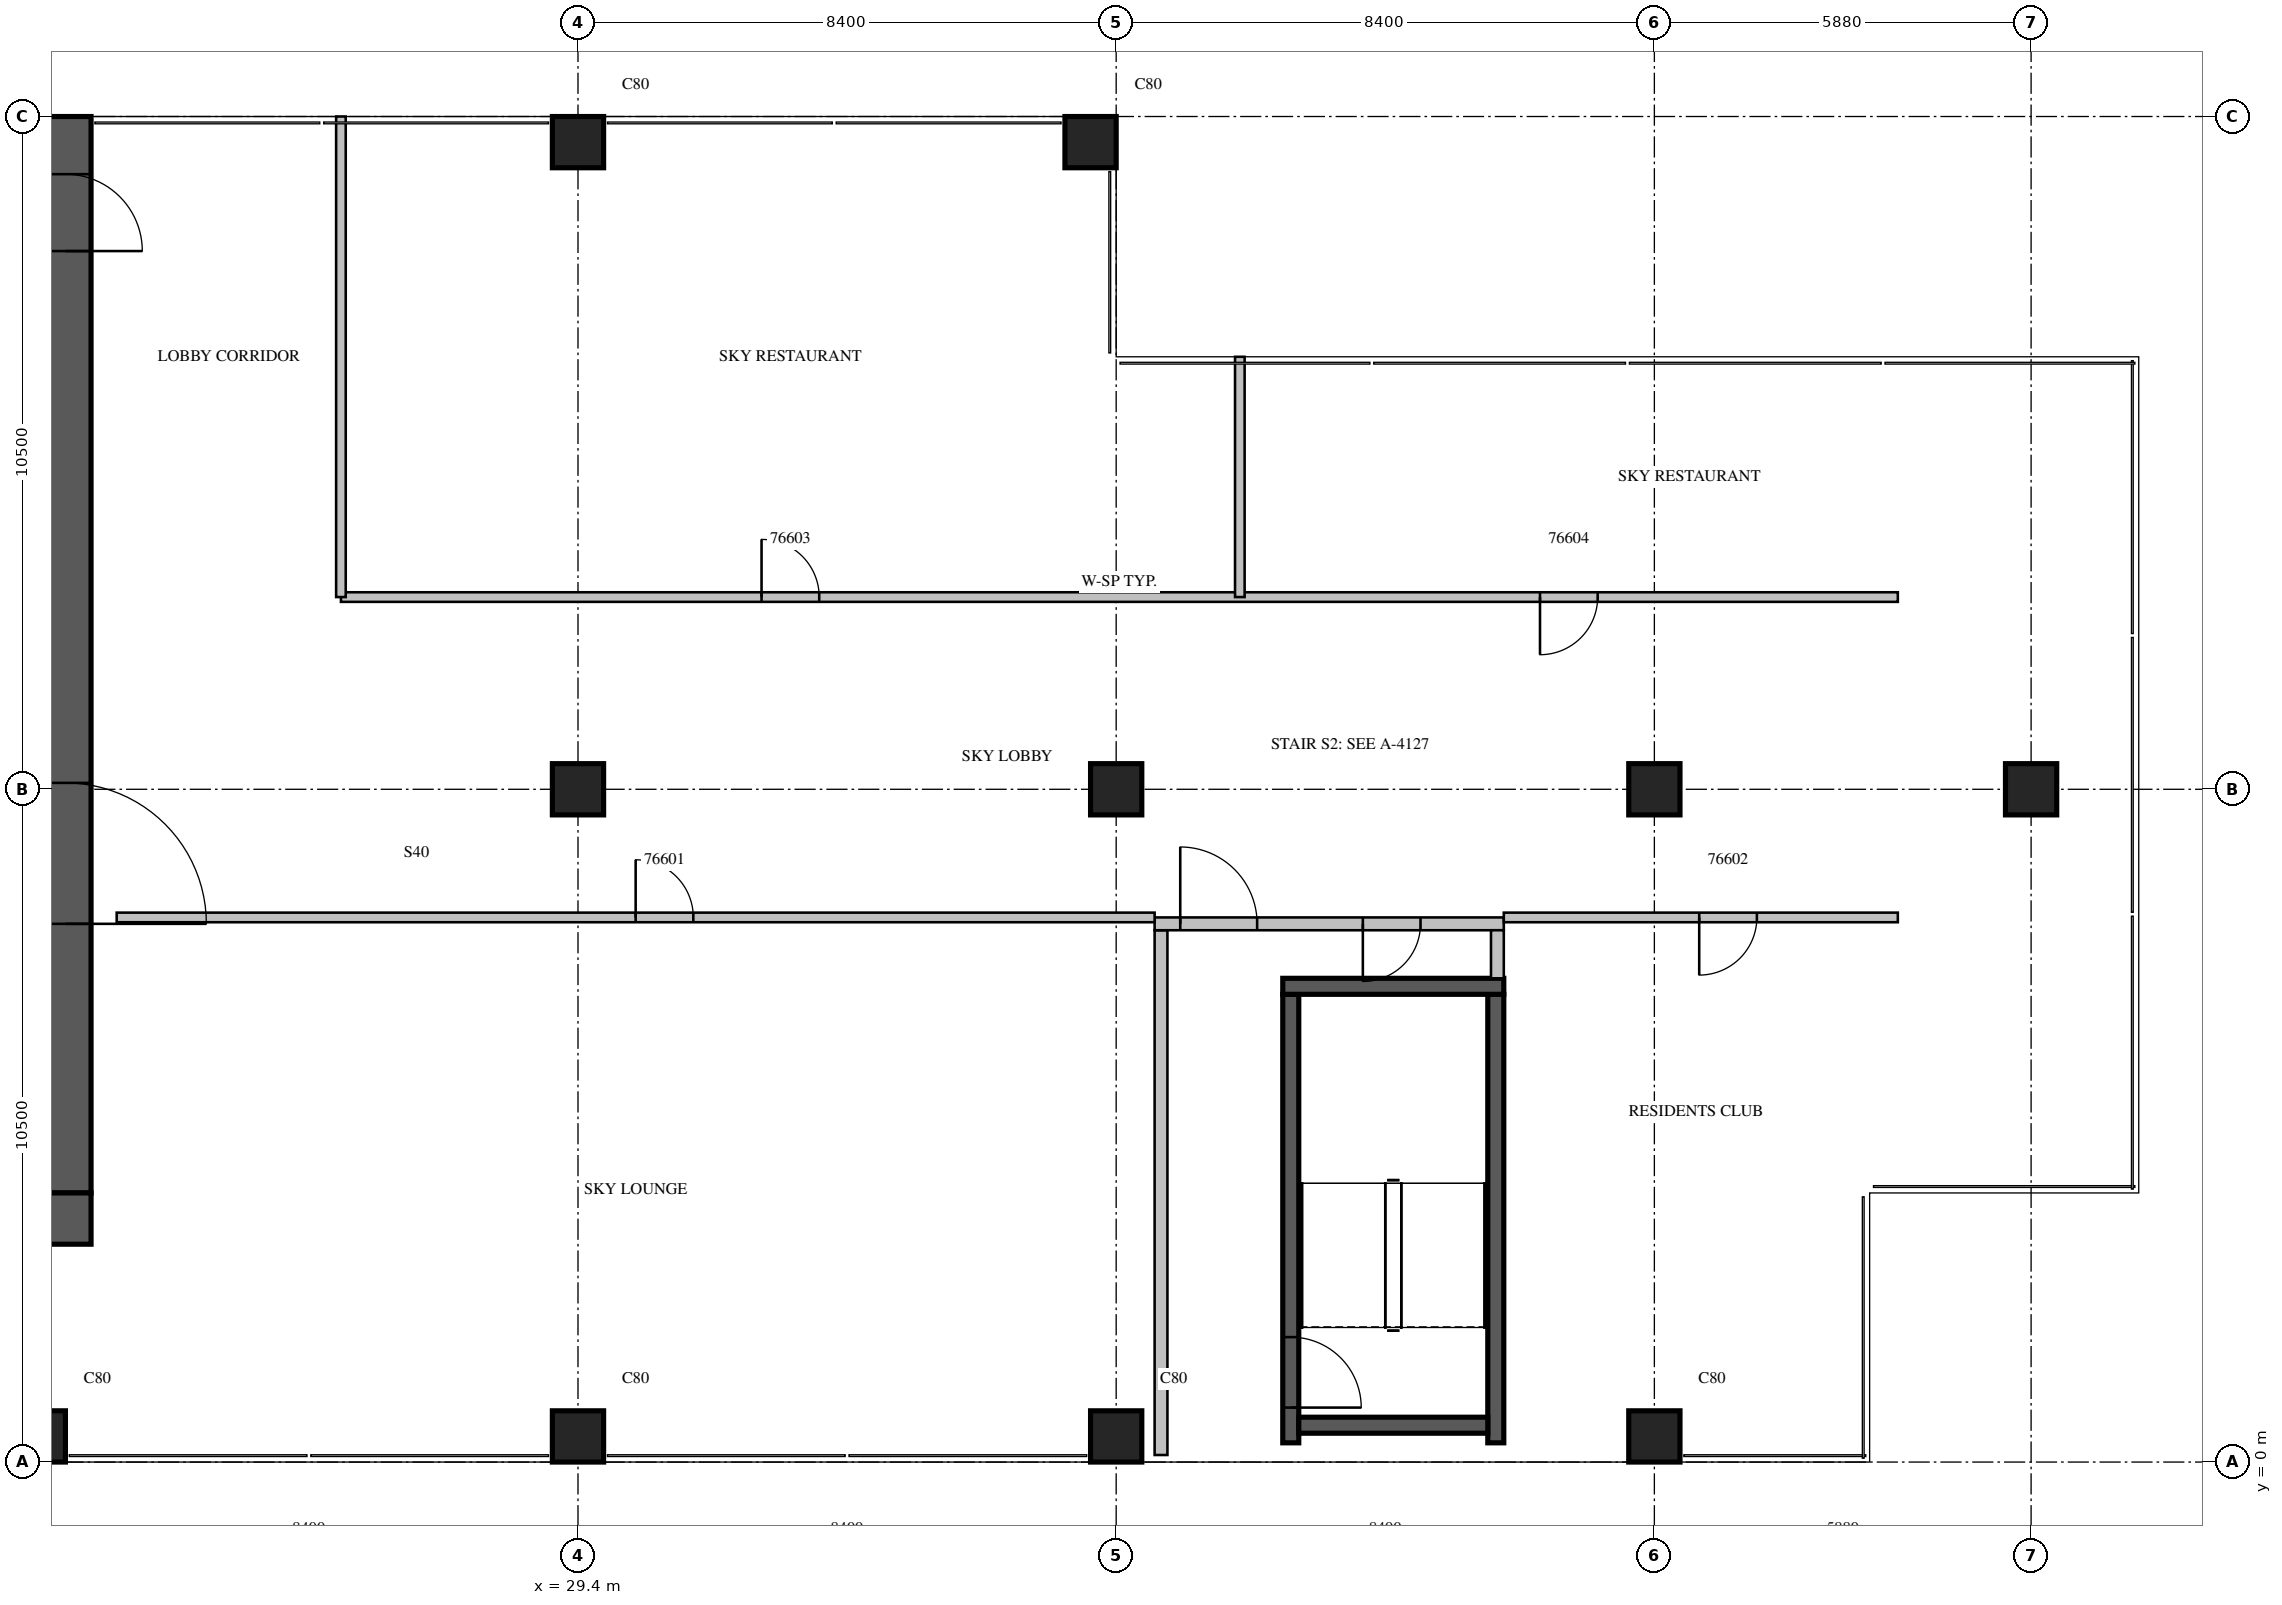
"""IFC4 building model, lengths in metres.
Left out: names, types, materials, properties, quantities, classifications, styles, units other than length and angle.
Written with IfcOpenShell. Run it as: python <this file> out.ifc"""

import sys

from ifc_helpers import new_model, si_unit, direction, frame, frame_2d, origin, origin_2d, place, context, subcontext, project, spatial, rectangle, extrude, source, transform, mapped, element, fill, save


model = new_model("IFC4")
c1 = context("Model", 3, precision=1e-05, world=origin(), true_north=direction((0.0, 1.0)))
c2 = subcontext(c1, "Body", "Model", "MODEL_VIEW")
j1 = project(units=[si_unit("LENGTHUNIT", "METRE"), si_unit("PLANEANGLEUNIT", "RADIAN")], contexts=[c1])
p1 = place(None, origin())
s1 = spatial("IfcSite", under=j1, at=p1, CompositionType="ELEMENT")
p2 = place(p1, origin())
s2 = spatial("IfcBuilding", under=s1, at=p2, CompositionType="ELEMENT")
p3 = place(p2, frame((0.0, 0.0, 277.0)))
s3 = spatial("IfcBuildingStorey", under=s2, at=p3, CompositionType="ELEMENT", Elevation=277.0)
m1 = source(origin(), c2, "Body", "SweptSolid", [
    extrude(rectangle(XDim=0.8, YDim=0.8, at=origin_2d()), origin(), (0.0, 0.0, 1.0), 7.5),
])
for number, where, z_axis, x_axis in (
    (1, (21.0, 0.4, 0.0), (0.0, 0.0, 1.0), (1.0, 0.0, 0.0)),
    (2, (29.4, 0.4, 0.0), (0.0, 0.0, 1.0), (1.0, 0.0, 0.0)),
    (3, (37.8, 0.4, 0.0), (0.0, 0.0, 1.0), (1.0, 0.0, 0.0)),
    (4, (46.2, 0.4, 0.0), (0.0, 0.0, 1.0), (1.0, 0.0, 0.0)),
    (5, (29.4, 10.5, 0.0), (0.0, 0.0, 1.0), (1.0, 0.0, 0.0)),
    (6, (37.8, 10.5, 0.0), (0.0, 0.0, 1.0), (1.0, 0.0, 0.0)),
    (7, (46.2, 10.5, 0.0), (0.0, 0.0, 1.0), (1.0, 0.0, 0.0)),
    (8, (52.08, 10.5, 0.0), (0.0, 0.0, 1.0), (1.0, 0.0, 0.0)),
    (9, (29.4, 20.6, 0.0), (0.0, 0.0, 1.0), (1.0, 0.0, 0.0)),
    (10, (37.4, 20.6, 0.0), (0.0, 0.0, 1.0), (1.0, 0.0, 0.0)),
):
    element("IfcColumn", number, at=place(p3, frame(where, z_axis=z_axis, x_axis=x_axis)), inside=s3, PredefinedType="COLUMN", context=c2, shape_type="MappedRepresentation", body=[
        mapped(m1, transform((0.0, 0.0, 0.0), scale=1.0)),
    ])
p4 = place(p3, frame((21.4, 4.2, 0.0), z_axis=(0.0, 0.0, 1.0), x_axis=(0.0, 1.0, 0.0)))
e11 = element("IfcWall", 11, at=p4, inside=s3, PredefinedType="SHEAR", context=c2, shape_type="SweptSolid", body=[
    extrude(rectangle(XDim=16.8, YDim=0.8, at=frame_2d((8.4, 0.0))), origin(), (0.0, 0.0, 1.0), 7.5),
])
m2 = source(origin(), c2, "Body", "SweptSolid", [
    extrude(rectangle(XDim=2.2, YDim=2.1, at=frame_2d((1.1, 1.05))), frame((0.0, 0.41, 0.0), z_axis=(0.0, -1.0, 0.0), x_axis=(1.0, 0.0, 0.0)), (0.0, 0.0, 1.0), 0.82),
])
p5 = place(p4, frame((4.2, 0.0, 0.0)))
e12 = element("IfcOpeningElement", 12, at=p5, cuts=e11, PredefinedType="OPENING", context=c2, shape_type="MappedRepresentation", body=[
    mapped(m2, transform((0.0, 0.0, 0.0), scale=1.0)),
])
m3 = source(origin(), c2, "Body", "SweptSolid", [
    extrude(rectangle(XDim=1.2, YDim=2.1, at=frame_2d((0.6, 1.05))), frame((0.0, 0.41, 0.0), z_axis=(0.0, -1.0, 0.0), x_axis=(1.0, 0.0, 0.0)), (0.0, 0.0, 1.0), 0.82),
])
p6 = place(p4, frame((14.7, 0.0, 0.0)))
e13 = element("IfcOpeningElement", 13, at=p6, cuts=e11, PredefinedType="OPENING", context=c2, shape_type="MappedRepresentation", body=[
    mapped(m3, transform((0.0, 0.0, 0.0), scale=1.0)),
])
m4 = source(origin(), c2, "Body", "SweptSolid", [
    extrude(rectangle(XDim=17.6, YDim=0.8, at=frame_2d((8.8, 0.0))), origin(), (0.0, 0.0, 1.0), 7.5),
])
p7 = place(p3, frame((4.2, 3.8, 0.0), z_axis=(0.0, 0.0, 1.0), x_axis=(1.0, 0.0, 0.0)))
e14 = element("IfcWall", 14, at=p7, inside=s3, PredefinedType="SHEAR", context=c2, shape_type="MappedRepresentation", body=[
    mapped(m4, transform((0.0, 0.0, 0.0), scale=1.0)),
])
m5 = source(origin(), c2, "Body", "SweptSolid", [
    extrude(rectangle(XDim=0.9, YDim=2.1, at=frame_2d((0.45, 1.05))), frame((0.0, 0.41, 0.0), z_axis=(0.0, -1.0, 0.0), x_axis=(1.0, 0.0, 0.0)), (0.0, 0.0, 1.0), 0.82),
])
p8 = place(p7, frame((11.55, 0.0, 0.0)))
e15 = element("IfcOpeningElement", 15, at=p8, cuts=e14, PredefinedType="OPENING", context=c2, shape_type="MappedRepresentation", body=[
    mapped(m5, transform((0.0, 0.0, 0.0), scale=1.0)),
])
m6 = source(origin(), c2, "Body", "SweptSolid", [
    extrude(rectangle(XDim=7.0, YDim=0.25, at=frame_2d((3.5, 0.0))), origin(), (0.0, 0.0, 1.0), 7.1),
])
p9 = place(p3, frame((40.525, 0.3, 0.0), z_axis=(0.0, 0.0, 1.0), x_axis=(0.0, 1.0, 0.0)))
e16 = element("IfcWall", 16, at=p9, inside=s3, PredefinedType="SOLIDWALL", context=c2, shape_type="MappedRepresentation", body=[
    mapped(m6, transform((0.0, 0.0, 0.0), scale=1.0)),
])
m7 = source(origin(), c2, "Body", "SweptSolid", [
    extrude(rectangle(XDim=1.1, YDim=2.1, at=frame_2d((0.55, 1.05))), frame((0.0, 0.135, 0.0), z_axis=(0.0, -1.0, 0.0), x_axis=(1.0, 0.0, 0.0)), (0.0, 0.0, 1.0), 0.27),
])
p10 = place(p9, frame((0.55, 0.0, 0.0)))
e17 = element("IfcOpeningElement", 17, at=p10, cuts=e16, PredefinedType="OPENING", context=c2, shape_type="MappedRepresentation", body=[
    mapped(m7, transform((0.0, 0.0, 0.0), scale=1.0)),
])
p11 = place(p3, frame((43.725, 0.3, 0.0), z_axis=(0.0, 0.0, 1.0), x_axis=(0.0, 1.0, 0.0)))
e18 = element("IfcWall", 18, at=p11, inside=s3, PredefinedType="SOLIDWALL", context=c2, shape_type="MappedRepresentation", body=[
    mapped(m6, transform((0.0, 0.0, 0.0), scale=1.0)),
])
m8 = source(origin(), c2, "Body", "SweptSolid", [
    extrude(rectangle(XDim=3.45, YDim=0.25, at=frame_2d((1.725, 0.0))), origin(), (0.0, 0.0, 1.0), 7.1),
])
p12 = place(p3, frame((40.4, 7.425, 0.0), z_axis=(0.0, 0.0, 1.0), x_axis=(1.0, 0.0, 0.0)))
e19 = element("IfcWall", 19, at=p12, inside=s3, PredefinedType="SOLIDWALL", context=c2, shape_type="MappedRepresentation", body=[
    mapped(m8, transform((0.0, 0.0, 0.0), scale=1.0)),
])
m9 = source(origin(), c2, "Body", "SweptSolid", [
    extrude(rectangle(XDim=2.95, YDim=0.25, at=frame_2d((1.475, 0.0))), origin(), (0.0, 0.0, 1.0), 7.1),
])
p13 = place(p3, frame((40.65, 0.575, 0.0), z_axis=(0.0, 0.0, 1.0), x_axis=(1.0, 0.0, 0.0)))
e20 = element("IfcWall", 20, at=p13, inside=s3, PredefinedType="SOLIDWALL", context=c2, shape_type="MappedRepresentation", body=[
    mapped(m9, transform((0.0, 0.0, 0.0), scale=1.0)),
])
p14 = place(p3, frame((38.5, 0.11, 0.0), z_axis=(0.0, 0.0, 1.0), x_axis=(0.0, 1.0, 0.0)))
e21 = element("IfcWall", 21, at=p14, inside=s3, PredefinedType="PARTITIONING", context=c2, shape_type="SweptSolid", body=[
    extrude(rectangle(XDim=8.19, YDim=0.2, at=frame_2d((4.095, 0.0))), origin(), (0.0, 0.0, 1.0), 7.1),
])
m10 = source(origin(), c2, "Body", "SweptSolid", [
    extrude(rectangle(XDim=5.45, YDim=0.2, at=frame_2d((2.725, 0.0))), origin(), (0.0, 0.0, 1.0), 7.1),
])
p15 = place(p3, frame((38.4, 8.4, 0.0), z_axis=(0.0, 0.0, 1.0), x_axis=(1.0, 0.0, 0.0)))
e22 = element("IfcWall", 22, at=p15, inside=s3, PredefinedType="PARTITIONING", context=c2, shape_type="MappedRepresentation", body=[
    mapped(m10, transform((0.0, 0.0, 0.0), scale=1.0)),
])
m11 = source(origin(), c2, "Body", "SweptSolid", [
    extrude(rectangle(XDim=1.2, YDim=2.1, at=frame_2d((0.6, 1.05))), frame((0.0, 0.11, 0.0), z_axis=(0.0, -1.0, 0.0), x_axis=(1.0, 0.0, 0.0)), (0.0, 0.0, 1.0), 0.22),
])
p16 = place(p15, frame((0.4, 0.0, 0.0)))
e23 = element("IfcOpeningElement", 23, at=p16, cuts=e22, PredefinedType="OPENING", context=c2, shape_type="MappedRepresentation", body=[
    mapped(m11, transform((0.0, 0.0, 0.0), scale=1.0)),
])
m12 = source(origin(), c2, "Body", "SweptSolid", [
    extrude(rectangle(XDim=0.9, YDim=2.1, at=frame_2d((0.45, 1.05))), frame((0.0, 0.11, 0.0), z_axis=(0.0, -1.0, 0.0), x_axis=(1.0, 0.0, 0.0)), (0.0, 0.0, 1.0), 0.22),
])
p17 = place(p15, frame((3.25, 0.0, 0.0)))
e24 = element("IfcOpeningElement", 24, at=p17, cuts=e22, PredefinedType="OPENING", context=c2, shape_type="MappedRepresentation", body=[
    mapped(m12, transform((0.0, 0.0, 0.0), scale=1.0)),
])
m13 = source(origin(), c2, "Body", "SweptSolid", [
    extrude(rectangle(XDim=0.75, YDim=0.2, at=frame_2d((0.375, 0.0))), origin(), (0.0, 0.0, 1.0), 7.1),
])
p18 = place(p3, frame((43.75, 7.55, 0.0), z_axis=(0.0, 0.0, 1.0), x_axis=(0.0, 1.0, 0.0)))
e25 = element("IfcWall", 25, at=p18, inside=s3, PredefinedType="PARTITIONING", context=c2, shape_type="MappedRepresentation", body=[
    mapped(m13, transform((0.0, 0.0, 0.0), scale=1.0)),
])
m14 = source(origin(), c2, "Body", "SweptSolid", [
    extrude(rectangle(XDim=16.2, YDim=0.15, at=frame_2d((8.1, 0.0))), origin(), (0.0, 0.0, 1.0), 7.1),
])
p19 = place(p3, frame((22.2, 8.5, 0.0), z_axis=(0.0, 0.0, 1.0), x_axis=(1.0, 0.0, 0.0)))
e26 = element("IfcWall", 26, at=p19, inside=s3, PredefinedType="PARTITIONING", context=c2, shape_type="MappedRepresentation", body=[
    mapped(m14, transform((0.0, 0.0, 0.0), scale=1.0)),
])
m15 = source(origin(), c2, "Body", "SweptSolid", [
    extrude(rectangle(XDim=0.9, YDim=2.1, at=frame_2d((0.45, 1.05))), frame((0.0, 0.085, 0.0), z_axis=(0.0, -1.0, 0.0), x_axis=(1.0, 0.0, 0.0)), (0.0, 0.0, 1.0), 0.17),
])
p20 = place(p19, frame((8.1, 0.0, 0.0)))
e27 = element("IfcOpeningElement", 27, at=p20, cuts=e26, PredefinedType="OPENING", context=c2, shape_type="MappedRepresentation", body=[
    mapped(m15, transform((0.0, 0.0, 0.0), scale=1.0)),
])
m16 = source(origin(), c2, "Body", "SweptSolid", [
    extrude(rectangle(XDim=6.15, YDim=0.15, at=frame_2d((3.075, 0.0))), origin(), (0.0, 0.0, 1.0), 7.1),
])
p21 = place(p3, frame((43.85, 8.5, 0.0), z_axis=(0.0, 0.0, 1.0), x_axis=(1.0, 0.0, 0.0)))
e28 = element("IfcWall", 28, at=p21, inside=s3, PredefinedType="PARTITIONING", context=c2, shape_type="MappedRepresentation", body=[
    mapped(m16, transform((0.0, 0.0, 0.0), scale=1.0)),
])
p22 = place(p21, frame((3.05, 0.0, 0.0)))
e29 = element("IfcOpeningElement", 29, at=p22, cuts=e28, PredefinedType="OPENING", context=c2, shape_type="MappedRepresentation", body=[
    mapped(m15, transform((0.0, 0.0, 0.0), scale=1.0)),
])
m17 = source(origin(), c2, "Body", "SweptSolid", [
    extrude(rectangle(XDim=24.3, YDim=0.15, at=frame_2d((12.15, 0.0))), origin(), (0.0, 0.0, 1.0), 7.1),
])
p23 = place(p3, frame((25.7, 13.5, 0.0), z_axis=(0.0, 0.0, 1.0), x_axis=(1.0, 0.0, 0.0)))
e30 = element("IfcWall", 30, at=p23, inside=s3, PredefinedType="PARTITIONING", context=c2, shape_type="MappedRepresentation", body=[
    mapped(m17, transform((0.0, 0.0, 0.0), scale=1.0)),
])
p24 = place(p23, frame((6.565, 0.0, 0.0)))
e31 = element("IfcOpeningElement", 31, at=p24, cuts=e30, PredefinedType="OPENING", context=c2, shape_type="MappedRepresentation", body=[
    mapped(m15, transform((0.0, 0.0, 0.0), scale=1.0)),
])
p25 = place(p23, frame((18.715, 0.0, 0.0)))
e32 = element("IfcOpeningElement", 32, at=p25, cuts=e30, PredefinedType="OPENING", context=c2, shape_type="MappedRepresentation", body=[
    mapped(m15, transform((0.0, 0.0, 0.0), scale=1.0)),
])
m18 = source(origin(), c2, "Body", "SweptSolid", [
    extrude(rectangle(XDim=7.5, YDim=0.15, at=frame_2d((3.75, 0.0))), origin(), (0.0, 0.0, 1.0), 7.1),
])
p26 = place(p3, frame((25.7, 13.5, 0.0), z_axis=(0.0, 0.0, 1.0), x_axis=(0.0, 1.0, 0.0)))
e33 = element("IfcWall", 33, at=p26, inside=s3, PredefinedType="PARTITIONING", context=c2, shape_type="MappedRepresentation", body=[
    mapped(m18, transform((0.0, 0.0, 0.0), scale=1.0)),
])
p27 = place(p3, frame((39.73, 13.5, 0.0), z_axis=(0.0, 0.0, 1.0), x_axis=(0.0, 1.0, 0.0)))
e34 = element("IfcWall", 34, at=p27, inside=s3, PredefinedType="PARTITIONING", context=c2, shape_type="SweptSolid", body=[
    extrude(rectangle(XDim=3.75, YDim=0.15, at=frame_2d((1.875, 0.0))), origin(), (0.0, 0.0, 1.0), 7.1),
])
m19 = source(origin(), c2, "Body", "SweptSolid", [
    extrude(rectangle(XDim=1.1, YDim=2.1, at=frame_2d((0.55, 1.05))), frame((0.0, 0.025, 0.0), z_axis=(0.0, -1.0, 0.0), x_axis=(1.0, 0.0, 0.0)), (0.0, 0.0, 1.0), 0.05),
])
p28 = place(p10, origin())
e35 = element("IfcDoor", 35, at=p28, inside=s3, OperationType="SINGLE_SWING_RIGHT", PredefinedType="DOOR", context=c2, shape_type="MappedRepresentation", body=[
    mapped(m19, transform((0.0, 0.0, 0.0), scale=1.0)),
])
fill(e17, e35)
m20 = source(origin(), c2, "Body", "SweptSolid", [
    extrude(rectangle(XDim=1.2, YDim=2.1, at=frame_2d((0.6, 1.05))), frame((0.0, 0.025, 0.0), z_axis=(0.0, -1.0, 0.0), x_axis=(1.0, 0.0, 0.0)), (0.0, 0.0, 1.0), 0.05),
])
p29 = place(p16, origin())
e36 = element("IfcDoor", 36, at=p29, inside=s3, OperationType="SINGLE_SWING_LEFT", PredefinedType="DOOR", context=c2, shape_type="MappedRepresentation", body=[
    mapped(m20, transform((0.0, 0.0, 0.0), scale=1.0)),
])
fill(e23, e36)
m21 = source(origin(), c2, "Body", "SweptSolid", [
    extrude(rectangle(XDim=0.9, YDim=2.1, at=frame_2d((0.45, 1.05))), frame((0.0, 0.025, 0.0), z_axis=(0.0, -1.0, 0.0), x_axis=(1.0, 0.0, 0.0)), (0.0, 0.0, 1.0), 0.05),
])
p30 = place(p17, origin())
e37 = element("IfcDoor", 37, at=p30, inside=s3, OperationType="SINGLE_SWING_RIGHT", PredefinedType="DOOR", context=c2, shape_type="MappedRepresentation", body=[
    mapped(m21, transform((0.0, 0.0, 0.0), scale=1.0)),
])
fill(e24, e37)
m22 = source(origin(), c2, "Body", "SweptSolid", [
    extrude(rectangle(XDim=2.2, YDim=2.1, at=frame_2d((1.1, 1.05))), frame((0.0, 0.025, 0.0), z_axis=(0.0, -1.0, 0.0), x_axis=(1.0, 0.0, 0.0)), (0.0, 0.0, 1.0), 0.05),
])
p31 = place(p5, origin())
e38 = element("IfcDoor", 38, at=p31, inside=s3, OperationType="DOUBLE_DOOR_SINGLE_SWING", PredefinedType="DOOR", context=c2, shape_type="MappedRepresentation", body=[
    mapped(m22, transform((0.0, 0.0, 0.0), scale=1.0)),
])
fill(e12, e38)
p32 = place(p6, origin())
e39 = element("IfcDoor", 39, at=p32, inside=s3, OperationType="SINGLE_SWING_RIGHT", PredefinedType="DOOR", context=c2, shape_type="MappedRepresentation", body=[
    mapped(m20, transform((0.0, 0.0, 0.0), scale=1.0)),
])
fill(e13, e39)
p33 = place(p20, origin())
e40 = element("IfcDoor", 40, at=p33, inside=s3, OperationType="SINGLE_SWING_LEFT", PredefinedType="DOOR", context=c2, shape_type="MappedRepresentation", body=[
    mapped(m21, transform((0.0, 0.0, 0.0), scale=1.0)),
])
fill(e27, e40)
p34 = place(p22, origin())
e41 = element("IfcDoor", 41, at=p34, inside=s3, OperationType="SINGLE_SWING_RIGHT", PredefinedType="DOOR", context=c2, shape_type="MappedRepresentation", body=[
    mapped(m21, transform((0.0, 0.0, 0.0), scale=1.0)),
])
fill(e29, e41)
p35 = place(p24, origin())
e42 = element("IfcDoor", 42, at=p35, inside=s3, OperationType="SINGLE_SWING_LEFT", PredefinedType="DOOR", context=c2, shape_type="MappedRepresentation", body=[
    mapped(m21, transform((0.0, 0.0, 0.0), scale=1.0)),
])
fill(e31, e42)
p36 = place(p25, origin())
e43 = element("IfcDoor", 43, at=p36, inside=s3, OperationType="SINGLE_SWING_RIGHT", PredefinedType="DOOR", context=c2, shape_type="MappedRepresentation", body=[
    mapped(m21, transform((0.0, 0.0, 0.0), scale=1.0)),
])
fill(e32, e43)
save(model, sys.argv[1])
